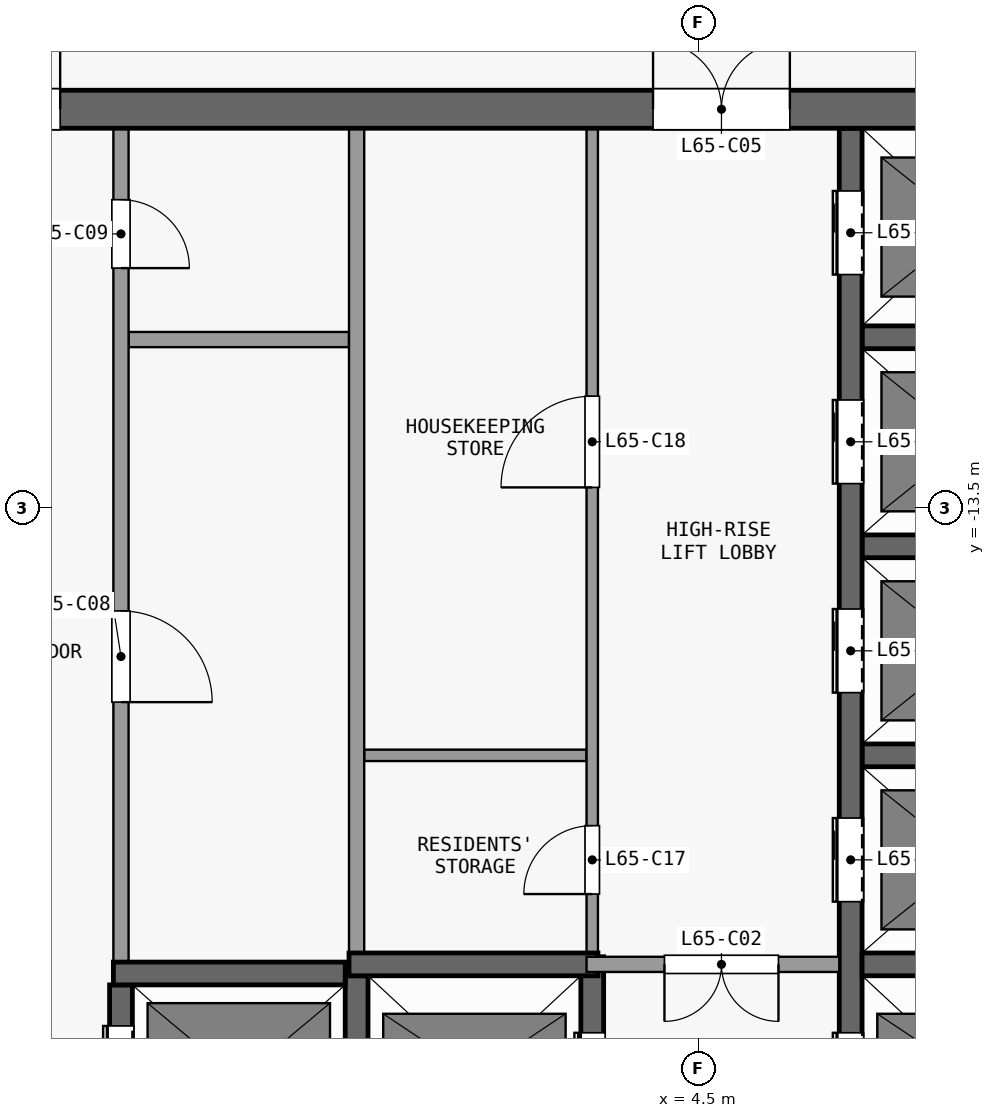
"""IFC4 building model, lengths in metres.
Left out: names, types, materials, properties, quantities, classifications, styles, units other than length and angle.
Written with IfcOpenShell. Run it as: python <this file> out.ifc"""

import sys

from ifc_helpers import new_model, si_unit, direction, frame, frame_2d, origin, place, context, subcontext, project, spatial, rectangle, extrude, element, fill, save


model = new_model("IFC4")
c1 = context("Model", 3, precision=1e-05, world=origin(), true_north=direction((0.0, 1.0)))
c2 = subcontext(c1, "Body", "Model", "MODEL_VIEW")
j1 = project(units=[si_unit("LENGTHUNIT", "METRE"), si_unit("PLANEANGLEUNIT", "RADIAN")], contexts=[c1])
p1 = place(None, origin())
s1 = spatial("IfcSite", under=j1, at=p1, CompositionType="ELEMENT")
p2 = place(p1, origin())
s2 = spatial("IfcBuilding", under=s1, at=p2, CompositionType="ELEMENT")
p3 = place(p2, frame((0.0, 0.0, 259.1)))
s3 = spatial("IfcBuildingStorey", under=s2, at=p3, CompositionType="ELEMENT", Elevation=259.1)
p4 = place(p3, frame((-13.1, -8.25, 0.0), z_axis=(0.0, 0.0, 1.0), x_axis=(1.0, 0.0, 0.0)))
e1 = element("IfcWall", 1, at=p4, inside=s3, PredefinedType="SHEAR", context=c2, shape_type="SweptSolid", body=[
    extrude(rectangle(XDim=26.2, YDim=0.5, at=frame_2d((13.1, 0.0))), origin(), (0.0, 0.0, 1.0), 3.3),
])
p5 = place(p4, frame((7.4, 0.0, 0.0)))
e2 = element("IfcOpeningElement", 2, at=p5, cuts=e1, PredefinedType="OPENING", context=c2, shape_type="SweptSolid", body=[
    extrude(rectangle(XDim=1.8, YDim=2.1, at=frame_2d((0.9, 1.05))), frame((0.0, 0.26, 0.0), z_axis=(0.0, -1.0, 0.0), x_axis=(1.0, 0.0, 0.0)), (0.0, 0.0, 1.0), 0.52),
])
p6 = place(p4, frame((17.0, 0.0, 0.0)))
e3 = element("IfcOpeningElement", 3, at=p6, cuts=e1, PredefinedType="OPENING", context=c2, shape_type="SweptSolid", body=[
    extrude(rectangle(XDim=1.8, YDim=2.1, at=frame_2d((0.9, 1.05))), frame((0.0, 0.26, 0.0), z_axis=(0.0, -1.0, 0.0), x_axis=(1.0, 0.0, 0.0)), (0.0, 0.0, 1.0), 0.52),
])
p7 = place(p4, frame((2.325, 0.0, 0.0)))
e4 = element("IfcOpeningElement", 4, at=p7, cuts=e1, PredefinedType="OPENING", context=c2, shape_type="SweptSolid", body=[
    extrude(rectangle(XDim=0.9, YDim=2.1, at=frame_2d((0.45, 1.05))), frame((0.0, 0.26, 0.0), z_axis=(0.0, -1.0, 0.0), x_axis=(1.0, 0.0, 0.0)), (0.0, 0.0, 1.0), 0.52),
])
p8 = place(p4, frame((23.675, 0.0, 0.0)))
e5 = element("IfcOpeningElement", 5, at=p8, cuts=e1, PredefinedType="OPENING", context=c2, shape_type="SweptSolid", body=[
    extrude(rectangle(XDim=1.2, YDim=2.1, at=frame_2d((0.6, 1.05))), frame((0.0, 0.26, 0.0), z_axis=(0.0, -1.0, 0.0), x_axis=(1.0, 0.0, 0.0)), (0.0, 0.0, 1.0), 0.52),
])
p9 = place(p3, frame((-3.2, -19.62, 0.0), z_axis=(0.0, 0.0, 1.0), x_axis=(1.0, 0.0, 0.0)))
e6 = element("IfcWall", 6, at=p9, inside=s3, PredefinedType="SHEAR", context=c2, shape_type="SweptSolid", body=[
    extrude(rectangle(XDim=3.05, YDim=0.3, at=frame_2d((1.525, 0.0))), origin(), (0.0, 0.0, 1.0), 3.3),
])
p10 = place(p3, frame((-0.1, -19.5, 0.0), z_axis=(0.0, 0.0, 1.0), x_axis=(1.0, 0.0, 0.0)))
e7 = element("IfcWall", 7, at=p10, inside=s3, PredefinedType="SHEAR", context=c2, shape_type="SweptSolid", body=[
    extrude(rectangle(XDim=3.275, YDim=0.3, at=frame_2d((1.638, 0.0))), origin(), (0.0, 0.0, 1.0), 3.3),
])
p11 = place(p3, frame((6.35, -19.5, 0.0), z_axis=(0.0, 0.0, 1.0), x_axis=(-1.0, 0.0, 0.0)))
e8 = element("IfcWall", 8, at=p11, inside=s3, PredefinedType="PARTITIONING", context=c2, shape_type="SweptSolid", body=[
    extrude(rectangle(XDim=3.325, YDim=0.2, at=frame_2d((1.663, 0.0))), origin(), (0.0, 0.0, 1.0), 3.3),
])
p12 = place(p11, frame((0.8, 0.0, 0.0)))
e9 = element("IfcOpeningElement", 9, at=p12, cuts=e8, PredefinedType="OPENING", context=c2, shape_type="SweptSolid", body=[
    extrude(rectangle(XDim=1.5, YDim=2.1, at=frame_2d((0.75, 1.05))), frame((0.0, 0.11, 0.0), z_axis=(0.0, -1.0, 0.0), x_axis=(1.0, 0.0, 0.0)), (0.0, 0.0, 1.0), 0.22),
])
p13 = place(p3, frame((6.65, -19.5, 0.0), z_axis=(0.0, 0.0, 1.0), x_axis=(1.0, 0.0, 0.0)))
e10 = element("IfcWall", 10, at=p13, inside=s3, PredefinedType="SHEAR", context=c2, shape_type="SweptSolid", body=[
    extrude(rectangle(XDim=2.8, YDim=0.3, at=frame_2d((1.4, 0.0))), origin(), (0.0, 0.0, 1.0), 3.3),
])
p14 = place(p3, frame((0.1, -16.75, 0.0), z_axis=(0.0, 0.0, 1.0), x_axis=(1.0, 0.0, 0.0)))
e11 = element("IfcWall", 11, at=p14, inside=s3, PredefinedType="PARTITIONING", context=c2, shape_type="SweptSolid", body=[
    extrude(rectangle(XDim=2.925, YDim=0.15, at=frame_2d((1.462, 0.0))), origin(), (0.0, 0.0, 1.0), 3.3),
])
for number, where, z_axis, x_axis in (
    (12, (6.65, -16.75, 0.0), (0.0, 0.0, 1.0), (1.0, 0.0, 0.0)),
    (13, (6.65, -14.0, 0.0), (0.0, 0.0, 1.0), (1.0, 0.0, 0.0)),
):
    element("IfcWall", number, at=place(p3, frame(where, z_axis=z_axis, x_axis=x_axis)), inside=s3, PredefinedType="SHEAR", context=c2, shape_type="SweptSolid", body=[
        extrude(rectangle(XDim=2.8, YDim=0.3, at=frame_2d((1.4, 0.0))), origin(), (0.0, 0.0, 1.0), 3.3),
    ])
p15 = place(p3, frame((-3.0, -11.28, 0.0), z_axis=(0.0, 0.0, 1.0), x_axis=(1.0, 0.0, 0.0)))
e14 = element("IfcWall", 14, at=p15, inside=s3, PredefinedType="PARTITIONING", context=c2, shape_type="SweptSolid", body=[
    extrude(rectangle(XDim=2.9, YDim=0.2, at=frame_2d((1.45, 0.0))), origin(), (0.0, 0.0, 1.0), 3.3),
])
p16 = place(p3, frame((6.65, -11.25, 0.0), z_axis=(0.0, 0.0, 1.0), x_axis=(1.0, 0.0, 0.0)))
e15 = element("IfcWall", 15, at=p16, inside=s3, PredefinedType="SHEAR", context=c2, shape_type="SweptSolid", body=[
    extrude(rectangle(XDim=2.8, YDim=0.3, at=frame_2d((1.4, 0.0))), origin(), (0.0, 0.0, 1.0), 3.3),
])
p17 = place(p3, frame((-3.1, -22.25, 0.0), z_axis=(0.0, 0.0, 1.0), x_axis=(0.0, 1.0, 0.0)))
e16 = element("IfcWall", 16, at=p17, inside=s3, PredefinedType="SHEAR", context=c2, shape_type="SweptSolid", body=[
    extrude(rectangle(XDim=2.48, YDim=0.3, at=frame_2d((1.24, 0.0))), origin(), (0.0, 0.0, 1.0), 3.3),
])
p18 = place(p17, frame((0.54, 0.0, 0.0)))
e17 = element("IfcOpeningElement", 17, at=p18, cuts=e16, PredefinedType="OPENING", context=c2, shape_type="SweptSolid", body=[
    extrude(rectangle(XDim=1.4, YDim=2.1, at=frame_2d((0.7, 1.05))), frame((0.0, 0.16, 0.0), z_axis=(0.0, -1.0, 0.0), x_axis=(1.0, 0.0, 0.0)), (0.0, 0.0, 1.0), 0.32),
])
p19 = place(p3, frame((-3.1, -8.5, 0.0), z_axis=(0.0, 0.0, 1.0), x_axis=(0.0, -1.0, 0.0)))
e18 = element("IfcWall", 18, at=p19, inside=s3, PredefinedType="PARTITIONING", context=c2, shape_type="SweptSolid", body=[
    extrude(rectangle(XDim=10.97, YDim=0.2, at=frame_2d((5.485, 0.0))), origin(), (0.0, 0.0, 1.0), 3.3),
])
p20 = place(p19, frame((6.35, 0.0, 0.0)))
e19 = element("IfcOpeningElement", 19, at=p20, cuts=e18, PredefinedType="OPENING", context=c2, shape_type="SweptSolid", body=[
    extrude(rectangle(XDim=1.2, YDim=2.1, at=frame_2d((0.6, 1.05))), frame((0.0, 0.11, 0.0), z_axis=(0.0, -1.0, 0.0), x_axis=(1.0, 0.0, 0.0)), (0.0, 0.0, 1.0), 0.22),
])
p21 = place(p19, frame((0.94, 0.0, 0.0)))
e20 = element("IfcOpeningElement", 20, at=p21, cuts=e18, PredefinedType="OPENING", context=c2, shape_type="SweptSolid", body=[
    extrude(rectangle(XDim=0.9, YDim=2.1, at=frame_2d((0.45, 1.05))), frame((0.0, 0.11, 0.0), z_axis=(0.0, -1.0, 0.0), x_axis=(1.0, 0.0, 0.0)), (0.0, 0.0, 1.0), 0.22),
])
p22 = place(p3, frame((0.0, -22.25, 0.0), z_axis=(0.0, 0.0, 1.0), x_axis=(0.0, 1.0, 0.0)))
e21 = element("IfcWall", 21, at=p22, inside=s3, PredefinedType="SHEAR", context=c2, shape_type="SweptSolid", body=[
    extrude(rectangle(XDim=2.6, YDim=0.3, at=frame_2d((1.3, 0.0))), origin(), (0.0, 0.0, 1.0), 3.3),
])
p23 = place(p3, frame((0.0, -19.35, 0.0), z_axis=(0.0, 0.0, 1.0), x_axis=(0.0, 1.0, 0.0)))
e22 = element("IfcWall", 22, at=p23, inside=s3, PredefinedType="PARTITIONING", context=c2, shape_type="SweptSolid", body=[
    extrude(rectangle(XDim=10.85, YDim=0.2, at=frame_2d((5.425, 0.0))), origin(), (0.0, 0.0, 1.0), 3.3),
])
p24 = place(p3, frame((3.1, -22.25, 0.0), z_axis=(0.0, 0.0, 1.0), x_axis=(0.0, 1.0, 0.0)))
e23 = element("IfcWall", 23, at=p24, inside=s3, PredefinedType="SHEAR", context=c2, shape_type="SweptSolid", body=[
    extrude(rectangle(XDim=2.85, YDim=0.3, at=frame_2d((1.425, 0.0))), origin(), (0.0, 0.0, 1.0), 3.3),
])
p25 = place(p24, frame((0.75, 0.0, 0.0)))
e24 = element("IfcOpeningElement", 24, at=p25, cuts=e23, PredefinedType="OPENING", context=c2, shape_type="SweptSolid", body=[
    extrude(rectangle(XDim=1.1, YDim=2.1, at=frame_2d((0.55, 1.05))), frame((0.0, 0.16, 0.0), z_axis=(0.0, -1.0, 0.0), x_axis=(1.0, 0.0, 0.0)), (0.0, 0.0, 1.0), 0.32),
])
p26 = place(p3, frame((3.1, -19.4, 0.0), z_axis=(0.0, 0.0, 1.0), x_axis=(0.0, 1.0, 0.0)))
e25 = element("IfcWall", 25, at=p26, inside=s3, PredefinedType="PARTITIONING", context=c2, shape_type="SweptSolid", body=[
    extrude(rectangle(XDim=10.9, YDim=0.15, at=frame_2d((5.45, 0.0))), origin(), (0.0, 0.0, 1.0), 3.3),
])
p27 = place(p26, frame((0.825, 0.0, 0.0)))
e26 = element("IfcOpeningElement", 26, at=p27, cuts=e25, PredefinedType="OPENING", context=c2, shape_type="SweptSolid", body=[
    extrude(rectangle(XDim=0.9, YDim=2.1, at=frame_2d((0.45, 1.05))), frame((0.0, 0.085, 0.0), z_axis=(0.0, -1.0, 0.0), x_axis=(1.0, 0.0, 0.0)), (0.0, 0.0, 1.0), 0.17),
])
p28 = place(p26, frame((6.175, 0.0, 0.0)))
e27 = element("IfcOpeningElement", 27, at=p28, cuts=e25, PredefinedType="OPENING", context=c2, shape_type="SweptSolid", body=[
    extrude(rectangle(XDim=1.2, YDim=2.1, at=frame_2d((0.6, 1.05))), frame((0.0, 0.085, 0.0), z_axis=(0.0, -1.0, 0.0), x_axis=(1.0, 0.0, 0.0)), (0.0, 0.0, 1.0), 0.17),
])
p29 = place(p3, frame((6.5, -22.55, 0.0), z_axis=(0.0, 0.0, 1.0), x_axis=(0.0, 1.0, 0.0)))
e28 = element("IfcWall", 28, at=p29, inside=s3, PredefinedType="SHEAR", context=c2, shape_type="SweptSolid", body=[
    extrude(rectangle(XDim=14.05, YDim=0.3, at=frame_2d((7.025, 0.0))), origin(), (0.0, 0.0, 1.0), 3.3),
])
p30 = place(p29, frame((1.05, 0.0, 0.0)))
e29 = element("IfcOpeningElement", 29, at=p30, cuts=e28, PredefinedType="OPENING", context=c2, shape_type="SweptSolid", body=[
    extrude(rectangle(XDim=1.1, YDim=2.1, at=frame_2d((0.55, 1.05))), frame((0.0, 0.16, 0.0), z_axis=(0.0, -1.0, 0.0), x_axis=(1.0, 0.0, 0.0)), (0.0, 0.0, 1.0), 0.32),
])
p31 = place(p29, frame((3.875, 0.0, 0.0)))
e30 = element("IfcOpeningElement", 30, at=p31, cuts=e28, PredefinedType="OPENING", context=c2, shape_type="SweptSolid", body=[
    extrude(rectangle(XDim=1.1, YDim=2.1, at=frame_2d((0.55, 1.05))), frame((0.0, 0.16, 0.0), z_axis=(0.0, -1.0, 0.0), x_axis=(1.0, 0.0, 0.0)), (0.0, 0.0, 1.0), 0.32),
])
p32 = place(p29, frame((6.625, 0.0, 0.0)))
e31 = element("IfcOpeningElement", 31, at=p32, cuts=e28, PredefinedType="OPENING", context=c2, shape_type="SweptSolid", body=[
    extrude(rectangle(XDim=1.1, YDim=2.1, at=frame_2d((0.55, 1.05))), frame((0.0, 0.16, 0.0), z_axis=(0.0, -1.0, 0.0), x_axis=(1.0, 0.0, 0.0)), (0.0, 0.0, 1.0), 0.32),
])
p33 = place(p29, frame((9.375, 0.0, 0.0)))
e32 = element("IfcOpeningElement", 32, at=p33, cuts=e28, PredefinedType="OPENING", context=c2, shape_type="SweptSolid", body=[
    extrude(rectangle(XDim=1.1, YDim=2.1, at=frame_2d((0.55, 1.05))), frame((0.0, 0.16, 0.0), z_axis=(0.0, -1.0, 0.0), x_axis=(1.0, 0.0, 0.0)), (0.0, 0.0, 1.0), 0.32),
])
p34 = place(p29, frame((12.125, 0.0, 0.0)))
e33 = element("IfcOpeningElement", 33, at=p34, cuts=e28, PredefinedType="OPENING", context=c2, shape_type="SweptSolid", body=[
    extrude(rectangle(XDim=1.1, YDim=2.1, at=frame_2d((0.55, 1.05))), frame((0.0, 0.16, 0.0), z_axis=(0.0, -1.0, 0.0), x_axis=(1.0, 0.0, 0.0)), (0.0, 0.0, 1.0), 0.32),
])
p35 = place(p25, origin())
e34 = element("IfcDoor", 34, at=p35, inside=s3, OperationType="DOUBLE_DOOR_SLIDING", PredefinedType="DOOR", context=c2, shape_type="SweptSolid", body=[
    extrude(rectangle(XDim=1.1, YDim=2.1, at=frame_2d((0.55, 1.05))), frame((0.0, 0.025, 0.0), z_axis=(0.0, -1.0, 0.0), x_axis=(1.0, 0.0, 0.0)), (0.0, 0.0, 1.0), 0.05),
])
fill(e24, e34)
p36 = place(p30, origin())
e35 = element("IfcDoor", 35, at=p36, inside=s3, OperationType="DOUBLE_DOOR_SLIDING", PredefinedType="DOOR", context=c2, shape_type="SweptSolid", body=[
    extrude(rectangle(XDim=1.1, YDim=2.1, at=frame_2d((0.55, 1.05))), frame((0.0, 0.025, 0.0), z_axis=(0.0, -1.0, 0.0), x_axis=(1.0, 0.0, 0.0)), (0.0, 0.0, 1.0), 0.05),
])
fill(e29, e35)
p37 = place(p31, origin())
e36 = element("IfcDoor", 36, at=p37, inside=s3, OperationType="DOUBLE_DOOR_SLIDING", PredefinedType="DOOR", context=c2, shape_type="SweptSolid", body=[
    extrude(rectangle(XDim=1.1, YDim=2.1, at=frame_2d((0.55, 1.05))), frame((0.0, 0.025, 0.0), z_axis=(0.0, -1.0, 0.0), x_axis=(1.0, 0.0, 0.0)), (0.0, 0.0, 1.0), 0.05),
])
fill(e30, e36)
p38 = place(p32, origin())
e37 = element("IfcDoor", 37, at=p38, inside=s3, OperationType="DOUBLE_DOOR_SLIDING", PredefinedType="DOOR", context=c2, shape_type="SweptSolid", body=[
    extrude(rectangle(XDim=1.1, YDim=2.1, at=frame_2d((0.55, 1.05))), frame((0.0, 0.025, 0.0), z_axis=(0.0, -1.0, 0.0), x_axis=(1.0, 0.0, 0.0)), (0.0, 0.0, 1.0), 0.05),
])
fill(e31, e37)
p39 = place(p33, origin())
e38 = element("IfcDoor", 38, at=p39, inside=s3, OperationType="DOUBLE_DOOR_SLIDING", PredefinedType="DOOR", context=c2, shape_type="SweptSolid", body=[
    extrude(rectangle(XDim=1.1, YDim=2.1, at=frame_2d((0.55, 1.05))), frame((0.0, 0.025, 0.0), z_axis=(0.0, -1.0, 0.0), x_axis=(1.0, 0.0, 0.0)), (0.0, 0.0, 1.0), 0.05),
])
fill(e32, e38)
p40 = place(p34, origin())
e39 = element("IfcDoor", 39, at=p40, inside=s3, OperationType="DOUBLE_DOOR_SLIDING", PredefinedType="DOOR", context=c2, shape_type="SweptSolid", body=[
    extrude(rectangle(XDim=1.1, YDim=2.1, at=frame_2d((0.55, 1.05))), frame((0.0, 0.025, 0.0), z_axis=(0.0, -1.0, 0.0), x_axis=(1.0, 0.0, 0.0)), (0.0, 0.0, 1.0), 0.05),
])
fill(e33, e39)
p41 = place(p18, origin())
e40 = element("IfcDoor", 40, at=p41, inside=s3, OperationType="DOUBLE_DOOR_SLIDING", PredefinedType="DOOR", context=c2, shape_type="SweptSolid", body=[
    extrude(rectangle(XDim=1.4, YDim=2.1, at=frame_2d((0.7, 1.05))), frame((0.0, 0.025, 0.0), z_axis=(0.0, -1.0, 0.0), x_axis=(1.0, 0.0, 0.0)), (0.0, 0.0, 1.0), 0.05),
])
fill(e17, e40)
p42 = place(p12, origin())
e41 = element("IfcDoor", 41, at=p42, inside=s3, OperationType="DOUBLE_DOOR_SINGLE_SWING", PredefinedType="DOOR", context=c2, shape_type="SweptSolid", body=[
    extrude(rectangle(XDim=1.5, YDim=2.1, at=frame_2d((0.75, 1.05))), frame((0.0, 0.025, 0.0), z_axis=(0.0, -1.0, 0.0), x_axis=(1.0, 0.0, 0.0)), (0.0, 0.0, 1.0), 0.05),
])
fill(e9, e41)
p43 = place(p5, origin())
e42 = element("IfcDoor", 42, at=p43, inside=s3, OperationType="DOUBLE_DOOR_SINGLE_SWING", PredefinedType="DOOR", context=c2, shape_type="SweptSolid", body=[
    extrude(rectangle(XDim=1.8, YDim=2.1, at=frame_2d((0.9, 1.05))), frame((0.0, 0.025, 0.0), z_axis=(0.0, -1.0, 0.0), x_axis=(1.0, 0.0, 0.0)), (0.0, 0.0, 1.0), 0.05),
])
fill(e2, e42)
p44 = place(p6, origin())
e43 = element("IfcDoor", 43, at=p44, inside=s3, OperationType="DOUBLE_DOOR_SINGLE_SWING", PredefinedType="DOOR", context=c2, shape_type="SweptSolid", body=[
    extrude(rectangle(XDim=1.8, YDim=2.1, at=frame_2d((0.9, 1.05))), frame((0.0, 0.025, 0.0), z_axis=(0.0, -1.0, 0.0), x_axis=(1.0, 0.0, 0.0)), (0.0, 0.0, 1.0), 0.05),
])
fill(e3, e43)
p45 = place(p20, origin())
e44 = element("IfcDoor", 44, at=p45, inside=s3, OperationType="SINGLE_SWING_RIGHT", PredefinedType="DOOR", context=c2, shape_type="SweptSolid", body=[
    extrude(rectangle(XDim=1.2, YDim=2.1, at=frame_2d((0.6, 1.05))), frame((0.0, 0.025, 0.0), z_axis=(0.0, -1.0, 0.0), x_axis=(1.0, 0.0, 0.0)), (0.0, 0.0, 1.0), 0.05),
])
fill(e19, e44)
p46 = place(p21, origin())
e45 = element("IfcDoor", 45, at=p46, inside=s3, OperationType="SINGLE_SWING_RIGHT", PredefinedType="DOOR", context=c2, shape_type="SweptSolid", body=[
    extrude(rectangle(XDim=0.9, YDim=2.1, at=frame_2d((0.45, 1.05))), frame((0.0, 0.025, 0.0), z_axis=(0.0, -1.0, 0.0), x_axis=(1.0, 0.0, 0.0)), (0.0, 0.0, 1.0), 0.05),
])
fill(e20, e45)
p47 = place(p27, origin())
e46 = element("IfcDoor", 46, at=p47, inside=s3, OperationType="SINGLE_SWING_LEFT", PredefinedType="DOOR", context=c2, shape_type="SweptSolid", body=[
    extrude(rectangle(XDim=0.9, YDim=2.1, at=frame_2d((0.45, 1.05))), frame((0.0, 0.025, 0.0), z_axis=(0.0, -1.0, 0.0), x_axis=(1.0, 0.0, 0.0)), (0.0, 0.0, 1.0), 0.05),
])
fill(e26, e46)
p48 = place(p28, origin())
e47 = element("IfcDoor", 47, at=p48, inside=s3, OperationType="SINGLE_SWING_LEFT", PredefinedType="DOOR", context=c2, shape_type="SweptSolid", body=[
    extrude(rectangle(XDim=1.2, YDim=2.1, at=frame_2d((0.6, 1.05))), frame((0.0, 0.025, 0.0), z_axis=(0.0, -1.0, 0.0), x_axis=(1.0, 0.0, 0.0)), (0.0, 0.0, 1.0), 0.05),
])
fill(e27, e47)
save(model, sys.argv[1])
